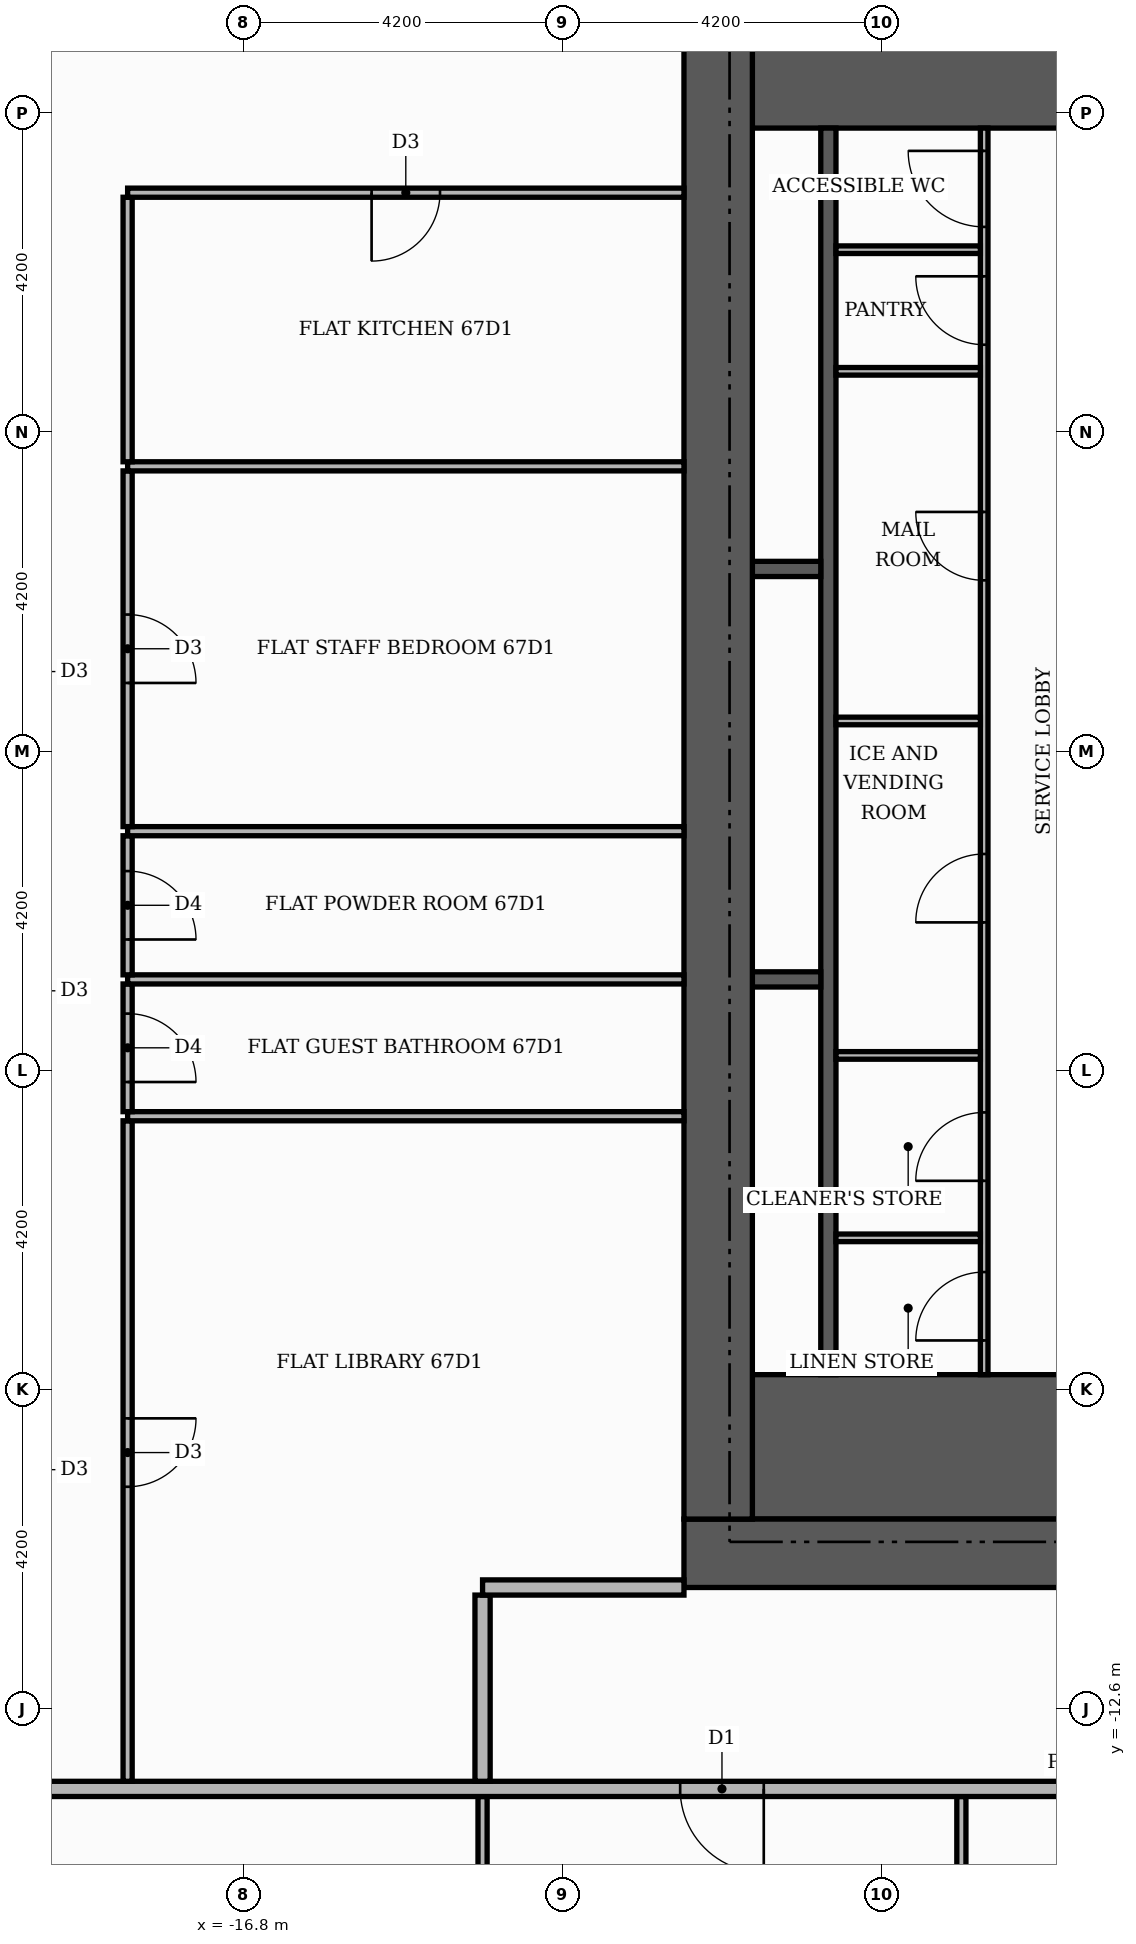
"""IFC4 building model, lengths in metres.
Left out: names, types, materials, properties, quantities, classifications, styles, units other than length and angle.
Written with IfcOpenShell. Run it as: python <this file> out.ifc"""

import sys

from ifc_helpers import new_model, si_unit, direction, frame, frame_2d, origin, place, context, subcontext, project, spatial, rectangle, extrude, element, fill, save


model = new_model("IFC4")
c1 = context("Model", 3, precision=1e-05, world=origin(), true_north=direction((0.0, 1.0)))
c2 = subcontext(c1, "Body", "Model", "MODEL_VIEW")
j1 = project(units=[si_unit("LENGTHUNIT", "METRE"), si_unit("PLANEANGLEUNIT", "RADIAN")], contexts=[c1])
p1 = place(None, origin())
s1 = spatial("IfcSite", under=j1, at=p1, CompositionType="ELEMENT")
p2 = place(p1, origin())
s2 = spatial("IfcBuilding", under=s1, at=p2, CompositionType="ELEMENT")
p3 = place(p2, frame((0.0, 0.0, 279.6)))
s3 = spatial("IfcBuildingStorey", under=s2, at=p3, CompositionType="ELEMENT", Elevation=279.6)
for number, where, z_axis, x_axis in (
    (1, (-10.1, -9.15, 0.0), (0.0, 0.0, 1.0), (1.0, 0.0, 0.0)),
    (2, (-10.1, 9.15, 0.0), (0.0, 0.0, 1.0), (1.0, 0.0, 0.0)),
):
    element("IfcWall", number, at=place(p3, frame(where, z_axis=z_axis, x_axis=x_axis)), inside=s3, PredefinedType="SHEAR", context=c2, shape_type="SweptSolid", body=[
        extrude(rectangle(XDim=4.6, YDim=1.9, at=frame_2d((2.3, 0.0))), origin(), (0.0, 0.0, 1.0), 3.48),
    ])
p4 = place(p3, frame((-9.1, -8.2, 0.0), z_axis=(0.0, 0.0, 1.0), x_axis=(0.0, 1.0, 0.0)))
e3 = element("IfcWall", 3, at=p4, inside=s3, PredefinedType="SHEAR", context=c2, shape_type="SweptSolid", body=[
    extrude(rectangle(XDim=16.4, YDim=0.2, at=frame_2d((8.2, 0.0))), origin(), (0.0, 0.0, 1.0), 3.48),
])
for number, where, z_axis, x_axis in (
    (4, (-10.1, -3.0, 0.0), (0.0, 0.0, 1.0), (1.0, 0.0, 0.0)),
    (5, (-10.1, 2.4, 0.0), (0.0, 0.0, 1.0), (1.0, 0.0, 0.0)),
):
    element("IfcWall", number, at=place(p3, frame(where, z_axis=z_axis, x_axis=x_axis)), inside=s3, PredefinedType="SHEAR", context=c2, shape_type="SweptSolid", body=[
        extrude(rectangle(XDim=0.9, YDim=0.2, at=frame_2d((0.45, 0.0))), origin(), (0.0, 0.0, 1.0), 3.48),
    ])
p5 = place(p3, frame((-11.0, -10.55, 0.0), z_axis=(0.0, 0.0, 1.0), x_axis=(1.0, 0.0, 0.0)))
e6 = element("IfcWall", 6, at=p5, inside=s3, PredefinedType="SHEAR", context=c2, shape_type="SweptSolid", body=[
    extrude(rectangle(XDim=22.0, YDim=0.9, at=frame_2d((11.0, 0.0))), origin(), (0.0, 0.0, 1.0), 3.48),
])
p6 = place(p5, frame((7.4, 0.0, 0.0)))
e7 = element("IfcOpeningElement", 7, at=p6, cuts=e6, PredefinedType="OPENING", context=c2, shape_type="SweptSolid", body=[
    extrude(rectangle(XDim=1.8, YDim=2.2, at=frame_2d((0.9, 1.1))), frame((0.0, 0.46, 0.0), z_axis=(0.0, -1.0, 0.0), x_axis=(1.0, 0.0, 0.0)), (0.0, 0.0, 1.0), 0.92),
])
p7 = place(p3, frame((-10.55, -10.1, 0.0), z_axis=(0.0, 0.0, 1.0), x_axis=(0.0, 1.0, 0.0)))
e8 = element("IfcWall", 8, at=p7, inside=s3, PredefinedType="SHEAR", context=c2, shape_type="SweptSolid", body=[
    extrude(rectangle(XDim=20.2, YDim=0.9, at=frame_2d((10.1, 0.0))), origin(), (0.0, 0.0, 1.0), 3.48),
])
p8 = place(p3, frame((-7.05, -8.2, 0.0), z_axis=(0.0, 0.0, 1.0), x_axis=(0.0, 1.0, 0.0)))
e9 = element("IfcWall", 9, at=p8, inside=s3, PredefinedType="PARTITIONING", context=c2, shape_type="SweptSolid", body=[
    extrude(rectangle(XDim=16.4, YDim=0.1, at=frame_2d((8.2, 0.0))), origin(), (0.0, 0.0, 1.0), 3.48),
])
p9 = place(p8, frame((0.45, 0.0, 0.0)))
e10 = element("IfcOpeningElement", 10, at=p9, cuts=e9, PredefinedType="OPENING", context=c2, shape_type="SweptSolid", body=[
    extrude(rectangle(XDim=0.9, YDim=2.1, at=frame_2d((0.45, 1.05))), frame((0.0, 0.06, 0.0), z_axis=(0.0, -1.0, 0.0), x_axis=(1.0, 0.0, 0.0)), (0.0, 0.0, 1.0), 0.12),
])
p10 = place(p8, frame((2.55, 0.0, 0.0)))
e11 = element("IfcOpeningElement", 11, at=p10, cuts=e9, PredefinedType="OPENING", context=c2, shape_type="SweptSolid", body=[
    extrude(rectangle(XDim=0.9, YDim=2.1, at=frame_2d((0.45, 1.05))), frame((0.0, 0.06, 0.0), z_axis=(0.0, -1.0, 0.0), x_axis=(1.0, 0.0, 0.0)), (0.0, 0.0, 1.0), 0.12),
])
p11 = place(p8, frame((5.95, 0.0, 0.0)))
e12 = element("IfcOpeningElement", 12, at=p11, cuts=e9, PredefinedType="OPENING", context=c2, shape_type="SweptSolid", body=[
    extrude(rectangle(XDim=0.9, YDim=2.1, at=frame_2d((0.45, 1.05))), frame((0.0, 0.06, 0.0), z_axis=(0.0, -1.0, 0.0), x_axis=(1.0, 0.0, 0.0)), (0.0, 0.0, 1.0), 0.12),
])
p12 = place(p8, frame((10.45, 0.0, 0.0)))
e13 = element("IfcOpeningElement", 13, at=p12, cuts=e9, PredefinedType="OPENING", context=c2, shape_type="SweptSolid", body=[
    extrude(rectangle(XDim=0.9, YDim=2.1, at=frame_2d((0.45, 1.05))), frame((0.0, 0.06, 0.0), z_axis=(0.0, -1.0, 0.0), x_axis=(1.0, 0.0, 0.0)), (0.0, 0.0, 1.0), 0.12),
])
p13 = place(p8, frame((13.55, 0.0, 0.0)))
e14 = element("IfcOpeningElement", 14, at=p13, cuts=e9, PredefinedType="OPENING", context=c2, shape_type="SweptSolid", body=[
    extrude(rectangle(XDim=0.9, YDim=2.1, at=frame_2d((0.45, 1.05))), frame((0.0, 0.06, 0.0), z_axis=(0.0, -1.0, 0.0), x_axis=(1.0, 0.0, 0.0)), (0.0, 0.0, 1.0), 0.12),
])
p14 = place(p8, frame((15.1, 0.0, 0.0)))
e15 = element("IfcOpeningElement", 15, at=p14, cuts=e9, PredefinedType="OPENING", context=c2, shape_type="SweptSolid", body=[
    extrude(rectangle(XDim=1.0, YDim=2.1, at=frame_2d((0.5, 1.05))), frame((0.0, 0.06, 0.0), z_axis=(0.0, -1.0, 0.0), x_axis=(1.0, 0.0, 0.0)), (0.0, 0.0, 1.0), 0.12),
])
for number, where, z_axis, x_axis in (
    (16, (-9.0, -6.4, 0.0), (0.0, 0.0, 1.0), (1.0, 0.0, 0.0)),
    (17, (-9.0, -4.0, 0.0), (0.0, 0.0, 1.0), (1.0, 0.0, 0.0)),
    (18, (-9.0, 0.4, 0.0), (0.0, 0.0, 1.0), (1.0, 0.0, 0.0)),
    (19, (-9.0, 5.0, 0.0), (0.0, 0.0, 1.0), (1.0, 0.0, 0.0)),
    (20, (-9.0, 6.6, 0.0), (0.0, 0.0, 1.0), (1.0, 0.0, 0.0)),
):
    element("IfcWall", number, at=place(p3, frame(where, z_axis=z_axis, x_axis=x_axis)), inside=s3, PredefinedType="PARTITIONING", context=c2, shape_type="SweptSolid", body=[
        extrude(rectangle(XDim=1.9, YDim=0.1, at=frame_2d((0.95, 0.0))), origin(), (0.0, 0.0, 1.0), 3.48),
    ])
p15 = place(p3, frame((-13.65, -20.119, 0.0), z_axis=(0.0, 0.0, 1.0), x_axis=(0.0, 1.0, 0.0)))
e21 = element("IfcWall", 21, at=p15, inside=s3, PredefinedType="PARTITIONING", context=c2, shape_type="SweptSolid", body=[
    extrude(rectangle(XDim=6.369, YDim=0.12, at=frame_2d((3.185, 0.0))), origin(), (0.0, 0.0, 1.0), 3.48),
])
p16 = place(p15, frame((2.784, 0.0, 0.0)))
e22 = element("IfcOpeningElement", 22, at=p16, cuts=e21, PredefinedType="OPENING", context=c2, shape_type="SweptSolid", body=[
    extrude(rectangle(XDim=0.9, YDim=2.1, at=frame_2d((0.45, 1.05))), frame((0.0, 0.07, 0.0), z_axis=(0.0, -1.0, 0.0), x_axis=(1.0, 0.0, 0.0)), (0.0, 0.0, 1.0), 0.14),
])
p17 = place(p3, frame((-7.35, -18.56, 0.0), z_axis=(0.0, 0.0, 1.0), x_axis=(0.0, 1.0, 0.0)))
e23 = element("IfcWall", 23, at=p17, inside=s3, PredefinedType="PARTITIONING", context=c2, shape_type="SweptSolid", body=[
    extrude(rectangle(XDim=4.81, YDim=0.12, at=frame_2d((2.405, 0.0))), origin(), (0.0, 0.0, 1.0), 3.48),
])
p18 = place(p3, frame((-25.42, -13.65, 0.0), z_axis=(0.0, 0.0, 1.0), x_axis=(1.0, 0.0, 0.0)))
e24 = element("IfcWall", 24, at=p18, inside=s3, PredefinedType="PARTITIONING", context=c2, shape_type="SweptSolid", body=[
    extrude(rectangle(XDim=39.07, YDim=0.2, at=frame_2d((19.535, 0.0))), origin(), (0.0, 0.0, 1.0), 3.48),
])
p19 = place(p18, frame((14.37, 0.0, 0.0)))
e25 = element("IfcOpeningElement", 25, at=p19, cuts=e24, PredefinedType="OPENING", context=c2, shape_type="SweptSolid", body=[
    extrude(rectangle(XDim=1.1, YDim=2.4, at=frame_2d((0.55, 1.2))), frame((0.0, 0.11, 0.0), z_axis=(0.0, -1.0, 0.0), x_axis=(1.0, 0.0, 0.0)), (0.0, 0.0, 1.0), 0.22),
])
p20 = place(p3, frame((-18.32, -13.55, 0.0), z_axis=(0.0, 0.0, 1.0), x_axis=(0.0, 1.0, 0.0)))
e26 = element("IfcWall", 26, at=p20, inside=s3, PredefinedType="PARTITIONING", context=c2, shape_type="SweptSolid", body=[
    extrude(rectangle(XDim=8.69, YDim=0.12, at=frame_2d((4.345, 0.0))), origin(), (0.0, 0.0, 1.0), 3.48),
])
p21 = place(p20, frame((3.875, 0.0, 0.0)))
e27 = element("IfcOpeningElement", 27, at=p21, cuts=e26, PredefinedType="OPENING", context=c2, shape_type="SweptSolid", body=[
    extrude(rectangle(XDim=0.9, YDim=2.1, at=frame_2d((0.45, 1.05))), frame((0.0, 0.07, 0.0), z_axis=(0.0, -1.0, 0.0), x_axis=(1.0, 0.0, 0.0)), (0.0, 0.0, 1.0), 0.14),
])
p22 = place(p3, frame((-13.65, -13.55, 0.0), z_axis=(0.0, 0.0, 1.0), x_axis=(0.0, 1.0, 0.0)))
e28 = element("IfcWall", 28, at=p22, inside=s3, PredefinedType="PARTITIONING", context=c2, shape_type="SweptSolid", body=[
    extrude(rectangle(XDim=2.45, YDim=0.2, at=frame_2d((1.225, 0.0))), origin(), (0.0, 0.0, 1.0), 3.48),
])
p23 = place(p3, frame((-13.65, -11.0, 0.0), z_axis=(0.0, 0.0, 1.0), x_axis=(1.0, 0.0, 0.0)))
e29 = element("IfcWall", 29, at=p23, inside=s3, PredefinedType="PARTITIONING", context=c2, shape_type="SweptSolid", body=[
    extrude(rectangle(XDim=2.65, YDim=0.2, at=frame_2d((1.325, 0.0))), origin(), (0.0, 0.0, 1.0), 3.48),
])
p24 = place(p3, frame((-18.32, -4.8, 0.0), z_axis=(0.0, 0.0, 1.0), x_axis=(1.0, 0.0, 0.0)))
e30 = element("IfcWall", 30, at=p24, inside=s3, PredefinedType="PARTITIONING", context=c2, shape_type="SweptSolid", body=[
    extrude(rectangle(XDim=7.32, YDim=0.12, at=frame_2d((3.66, 0.0))), origin(), (0.0, 0.0, 1.0), 3.48),
])
p25 = place(p3, frame((-18.32, -4.74, 0.0), z_axis=(0.0, 0.0, 1.0), x_axis=(0.0, 1.0, 0.0)))
e31 = element("IfcWall", 31, at=p25, inside=s3, PredefinedType="PARTITIONING", context=c2, shape_type="SweptSolid", body=[
    extrude(rectangle(XDim=1.68, YDim=0.12, at=frame_2d((0.84, 0.0))), origin(), (0.0, 0.0, 1.0), 3.48),
])
p26 = place(p25, frame((0.39, 0.0, 0.0)))
e32 = element("IfcOpeningElement", 32, at=p26, cuts=e31, PredefinedType="OPENING", context=c2, shape_type="SweptSolid", body=[
    extrude(rectangle(XDim=0.9, YDim=2.1, at=frame_2d((0.45, 1.05))), frame((0.0, 0.07, 0.0), z_axis=(0.0, -1.0, 0.0), x_axis=(1.0, 0.0, 0.0)), (0.0, 0.0, 1.0), 0.14),
])
p27 = place(p3, frame((-18.32, -3.0, 0.0), z_axis=(0.0, 0.0, 1.0), x_axis=(1.0, 0.0, 0.0)))
e33 = element("IfcWall", 33, at=p27, inside=s3, PredefinedType="PARTITIONING", context=c2, shape_type="SweptSolid", body=[
    extrude(rectangle(XDim=7.32, YDim=0.12, at=frame_2d((3.66, 0.0))), origin(), (0.0, 0.0, 1.0), 3.48),
])
p28 = place(p3, frame((-18.32, -2.94, 0.0), z_axis=(0.0, 0.0, 1.0), x_axis=(0.0, 1.0, 0.0)))
e34 = element("IfcWall", 34, at=p28, inside=s3, PredefinedType="PARTITIONING", context=c2, shape_type="SweptSolid", body=[
    extrude(rectangle(XDim=1.83, YDim=0.12, at=frame_2d((0.915, 0.0))), origin(), (0.0, 0.0, 1.0), 3.48),
])
p29 = place(p28, frame((0.465, 0.0, 0.0)))
e35 = element("IfcOpeningElement", 35, at=p29, cuts=e34, PredefinedType="OPENING", context=c2, shape_type="SweptSolid", body=[
    extrude(rectangle(XDim=0.9, YDim=2.1, at=frame_2d((0.45, 1.05))), frame((0.0, 0.07, 0.0), z_axis=(0.0, -1.0, 0.0), x_axis=(1.0, 0.0, 0.0)), (0.0, 0.0, 1.0), 0.14),
])
p30 = place(p3, frame((-18.32, -1.05, 0.0), z_axis=(0.0, 0.0, 1.0), x_axis=(1.0, 0.0, 0.0)))
e36 = element("IfcWall", 36, at=p30, inside=s3, PredefinedType="PARTITIONING", context=c2, shape_type="SweptSolid", body=[
    extrude(rectangle(XDim=7.32, YDim=0.12, at=frame_2d((3.66, 0.0))), origin(), (0.0, 0.0, 1.0), 3.48),
])
p31 = place(p3, frame((-18.32, -0.99, 0.0), z_axis=(0.0, 0.0, 1.0), x_axis=(0.0, 1.0, 0.0)))
e37 = element("IfcWall", 37, at=p31, inside=s3, PredefinedType="PARTITIONING", context=c2, shape_type="SweptSolid", body=[
    extrude(rectangle(XDim=4.68, YDim=0.12, at=frame_2d((2.34, 0.0))), origin(), (0.0, 0.0, 1.0), 3.48),
])
p32 = place(p31, frame((1.89, 0.0, 0.0)))
e38 = element("IfcOpeningElement", 38, at=p32, cuts=e37, PredefinedType="OPENING", context=c2, shape_type="SweptSolid", body=[
    extrude(rectangle(XDim=0.9, YDim=2.1, at=frame_2d((0.45, 1.05))), frame((0.0, 0.07, 0.0), z_axis=(0.0, -1.0, 0.0), x_axis=(1.0, 0.0, 0.0)), (0.0, 0.0, 1.0), 0.14),
])
p33 = place(p3, frame((-18.32, 3.75, 0.0), z_axis=(0.0, 0.0, 1.0), x_axis=(1.0, 0.0, 0.0)))
e39 = element("IfcWall", 39, at=p33, inside=s3, PredefinedType="PARTITIONING", context=c2, shape_type="SweptSolid", body=[
    extrude(rectangle(XDim=7.32, YDim=0.12, at=frame_2d((3.66, 0.0))), origin(), (0.0, 0.0, 1.0), 3.48),
])
p34 = place(p3, frame((-18.32, 3.81, 0.0), z_axis=(0.0, 0.0, 1.0), x_axis=(0.0, 1.0, 0.0)))
e40 = element("IfcWall", 40, at=p34, inside=s3, PredefinedType="PARTITIONING", context=c2, shape_type="SweptSolid", body=[
    extrude(rectangle(XDim=3.48, YDim=0.12, at=frame_2d((1.74, 0.0))), origin(), (0.0, 0.0, 1.0), 3.48),
])
p35 = place(p3, frame((-18.32, 7.35, 0.0), z_axis=(0.0, 0.0, 1.0), x_axis=(1.0, 0.0, 0.0)))
e41 = element("IfcWall", 41, at=p35, inside=s3, PredefinedType="PARTITIONING", context=c2, shape_type="SweptSolid", body=[
    extrude(rectangle(XDim=7.32, YDim=0.12, at=frame_2d((3.66, 0.0))), origin(), (0.0, 0.0, 1.0), 3.48),
])
p36 = place(p35, frame((3.21, 0.0, 0.0)))
e42 = element("IfcOpeningElement", 42, at=p36, cuts=e41, PredefinedType="OPENING", context=c2, shape_type="SweptSolid", body=[
    extrude(rectangle(XDim=0.9, YDim=2.1, at=frame_2d((0.45, 1.05))), frame((0.0, 0.07, 0.0), z_axis=(0.0, -1.0, 0.0), x_axis=(1.0, 0.0, 0.0)), (0.0, 0.0, 1.0), 0.14),
])
p37 = place(p9, origin())
e43 = element("IfcDoor", 43, at=p37, inside=s3, OperationType="SINGLE_SWING_LEFT", PredefinedType="DOOR", context=c2, shape_type="SweptSolid", body=[
    extrude(rectangle(XDim=0.9, YDim=2.1, at=frame_2d((0.45, 1.05))), frame((0.0, 0.025, 0.0), z_axis=(0.0, -1.0, 0.0), x_axis=(1.0, 0.0, 0.0)), (0.0, 0.0, 1.0), 0.05),
])
fill(e10, e43)
p38 = place(p10, origin())
e44 = element("IfcDoor", 44, at=p38, inside=s3, OperationType="SINGLE_SWING_LEFT", PredefinedType="DOOR", context=c2, shape_type="SweptSolid", body=[
    extrude(rectangle(XDim=0.9, YDim=2.1, at=frame_2d((0.45, 1.05))), frame((0.0, 0.025, 0.0), z_axis=(0.0, -1.0, 0.0), x_axis=(1.0, 0.0, 0.0)), (0.0, 0.0, 1.0), 0.05),
])
fill(e11, e44)
p39 = place(p11, origin())
e45 = element("IfcDoor", 45, at=p39, inside=s3, OperationType="SINGLE_SWING_LEFT", PredefinedType="DOOR", context=c2, shape_type="SweptSolid", body=[
    extrude(rectangle(XDim=0.9, YDim=2.1, at=frame_2d((0.45, 1.05))), frame((0.0, 0.025, 0.0), z_axis=(0.0, -1.0, 0.0), x_axis=(1.0, 0.0, 0.0)), (0.0, 0.0, 1.0), 0.05),
])
fill(e12, e45)
p40 = place(p12, origin())
e46 = element("IfcDoor", 46, at=p40, inside=s3, OperationType="SINGLE_SWING_RIGHT", PredefinedType="DOOR", context=c2, shape_type="SweptSolid", body=[
    extrude(rectangle(XDim=0.9, YDim=2.1, at=frame_2d((0.45, 1.05))), frame((0.0, 0.025, 0.0), z_axis=(0.0, -1.0, 0.0), x_axis=(1.0, 0.0, 0.0)), (0.0, 0.0, 1.0), 0.05),
])
fill(e13, e46)
p41 = place(p13, origin())
e47 = element("IfcDoor", 47, at=p41, inside=s3, OperationType="SINGLE_SWING_RIGHT", PredefinedType="DOOR", context=c2, shape_type="SweptSolid", body=[
    extrude(rectangle(XDim=0.9, YDim=2.1, at=frame_2d((0.45, 1.05))), frame((0.0, 0.025, 0.0), z_axis=(0.0, -1.0, 0.0), x_axis=(1.0, 0.0, 0.0)), (0.0, 0.0, 1.0), 0.05),
])
fill(e14, e47)
p42 = place(p14, origin())
e48 = element("IfcDoor", 48, at=p42, inside=s3, OperationType="SINGLE_SWING_RIGHT", PredefinedType="DOOR", context=c2, shape_type="SweptSolid", body=[
    extrude(rectangle(XDim=1.0, YDim=2.1, at=frame_2d((0.5, 1.05))), frame((0.0, 0.025, 0.0), z_axis=(0.0, -1.0, 0.0), x_axis=(1.0, 0.0, 0.0)), (0.0, 0.0, 1.0), 0.05),
])
fill(e15, e48)
p43 = place(p19, frame((1.1, 0.0, 0.0), z_axis=(0.0, 0.0, 1.0), x_axis=(-1.0, 0.0, 0.0)))
e49 = element("IfcDoor", 49, at=p43, inside=s3, OperationType="SINGLE_SWING_RIGHT", PredefinedType="DOOR", context=c2, shape_type="SweptSolid", body=[
    extrude(rectangle(XDim=1.1, YDim=2.4, at=frame_2d((0.55, 1.2))), frame((0.0, 0.025, 0.0), z_axis=(0.0, -1.0, 0.0), x_axis=(1.0, 0.0, 0.0)), (0.0, 0.0, 1.0), 0.05),
])
fill(e25, e49)
p44 = place(p36, frame((0.9, 0.0, 0.0), z_axis=(0.0, 0.0, 1.0), x_axis=(-1.0, 0.0, 0.0)))
e50 = element("IfcDoor", 50, at=p44, inside=s3, OperationType="SINGLE_SWING_LEFT", PredefinedType="DOOR", context=c2, shape_type="SweptSolid", body=[
    extrude(rectangle(XDim=0.9, YDim=2.1, at=frame_2d((0.45, 1.05))), frame((0.0, 0.025, 0.0), z_axis=(0.0, -1.0, 0.0), x_axis=(1.0, 0.0, 0.0)), (0.0, 0.0, 1.0), 0.05),
])
fill(e42, e50)
p45 = place(p32, frame((0.9, 0.0, 0.0), z_axis=(0.0, 0.0, 1.0), x_axis=(-1.0, 0.0, 0.0)))
e51 = element("IfcDoor", 51, at=p45, inside=s3, OperationType="SINGLE_SWING_LEFT", PredefinedType="DOOR", context=c2, shape_type="SweptSolid", body=[
    extrude(rectangle(XDim=0.9, YDim=2.1, at=frame_2d((0.45, 1.05))), frame((0.0, 0.025, 0.0), z_axis=(0.0, -1.0, 0.0), x_axis=(1.0, 0.0, 0.0)), (0.0, 0.0, 1.0), 0.05),
])
fill(e38, e51)
p46 = place(p29, frame((0.9, 0.0, 0.0), z_axis=(0.0, 0.0, 1.0), x_axis=(-1.0, 0.0, 0.0)))
e52 = element("IfcDoor", 52, at=p46, inside=s3, OperationType="SINGLE_SWING_LEFT", PredefinedType="DOOR", context=c2, shape_type="SweptSolid", body=[
    extrude(rectangle(XDim=0.9, YDim=2.1, at=frame_2d((0.45, 1.05))), frame((0.0, 0.025, 0.0), z_axis=(0.0, -1.0, 0.0), x_axis=(1.0, 0.0, 0.0)), (0.0, 0.0, 1.0), 0.05),
])
fill(e35, e52)
p47 = place(p26, frame((0.9, 0.0, 0.0), z_axis=(0.0, 0.0, 1.0), x_axis=(-1.0, 0.0, 0.0)))
e53 = element("IfcDoor", 53, at=p47, inside=s3, OperationType="SINGLE_SWING_LEFT", PredefinedType="DOOR", context=c2, shape_type="SweptSolid", body=[
    extrude(rectangle(XDim=0.9, YDim=2.1, at=frame_2d((0.45, 1.05))), frame((0.0, 0.025, 0.0), z_axis=(0.0, -1.0, 0.0), x_axis=(1.0, 0.0, 0.0)), (0.0, 0.0, 1.0), 0.05),
])
fill(e32, e53)
p48 = place(p21, frame((0.9, 0.0, 0.0), z_axis=(0.0, 0.0, 1.0), x_axis=(-1.0, 0.0, 0.0)))
e54 = element("IfcDoor", 54, at=p48, inside=s3, OperationType="SINGLE_SWING_RIGHT", PredefinedType="DOOR", context=c2, shape_type="SweptSolid", body=[
    extrude(rectangle(XDim=0.9, YDim=2.1, at=frame_2d((0.45, 1.05))), frame((0.0, 0.025, 0.0), z_axis=(0.0, -1.0, 0.0), x_axis=(1.0, 0.0, 0.0)), (0.0, 0.0, 1.0), 0.05),
])
fill(e27, e54)
save(model, sys.argv[1])
